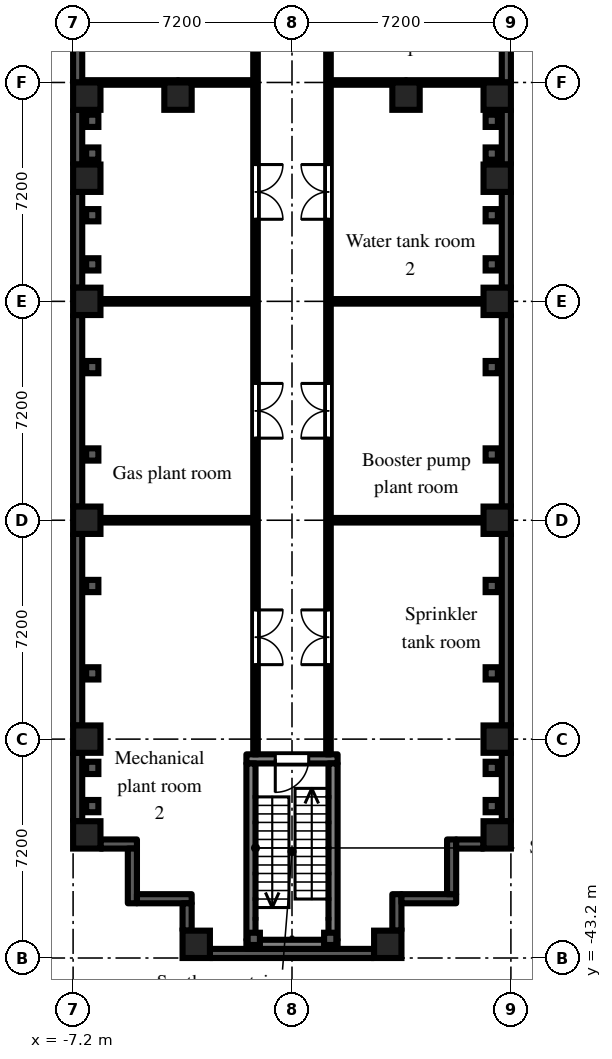
"""IFC4 building model, lengths in metres.
Left out: names, types, materials, properties, quantities, classifications, styles, units other than length and angle.
Written with IfcOpenShell. Run it as: python <this file> out.ifc"""

import sys

from ifc_helpers import new_model, si_unit, direction, frame, frame_2d, origin, origin_2d, place, context, subcontext, project, spatial, rectangle, extrude, element, fill, save


model = new_model("IFC4")
c1 = context("Model", 3, precision=1e-05, world=origin(), true_north=direction((0.0, 1.0)))
c2 = subcontext(c1, "Body", "Model", "MODEL_VIEW")
j1 = project(units=[si_unit("LENGTHUNIT", "METRE"), si_unit("PLANEANGLEUNIT", "RADIAN")], contexts=[c1])
p1 = place(None, origin())
s1 = spatial("IfcSite", under=j1, at=p1, CompositionType="ELEMENT")
p2 = place(p1, origin())
s2 = spatial("IfcBuilding", under=s1, at=p2, CompositionType="ELEMENT")
p3 = place(p2, frame((0.0, 0.0, 62.7)))
s3 = spatial("IfcBuildingStorey", under=s2, at=p3, CompositionType="ELEMENT", Elevation=62.7)
for number, where, z_axis, x_axis in (
    (1, (-6.75, -39.15, 0.0), (0.0, 0.0, 1.0), (1.0, 0.0, 0.0)),
    (2, (-6.75, -36.0, 0.0), (0.0, 0.0, 1.0), (1.0, 0.0, 0.0)),
    (3, (-6.75, -28.8, 0.0), (0.0, 0.0, 1.0), (1.0, 0.0, 0.0)),
    (4, (-6.75, -21.6, 0.0), (0.0, 0.0, 1.0), (1.0, 0.0, 0.0)),
    (5, (-6.75, -17.55, 0.0), (0.0, 0.0, 1.0), (1.0, 0.0, 0.0)),
    (6, (-6.75, -14.85, 0.0), (0.0, 0.0, 1.0), (1.0, 0.0, 0.0)),
    (7, (-3.75, -14.85, 0.0), (0.0, 0.0, 1.0), (1.0, 0.0, 0.0)),
    (8, (-3.15, -42.75, 0.0), (0.0, 0.0, 1.0), (1.0, 0.0, 0.0)),
    (9, (3.15, -42.75, 0.0), (0.0, 0.0, 1.0), (1.0, 0.0, 0.0)),
    (10, (3.75, -14.85, 0.0), (0.0, 0.0, 1.0), (1.0, 0.0, 0.0)),
    (11, (6.75, -39.15, 0.0), (0.0, 0.0, 1.0), (1.0, 0.0, 0.0)),
    (12, (6.75, -36.0, 0.0), (0.0, 0.0, 1.0), (1.0, 0.0, 0.0)),
    (13, (6.75, -28.8, 0.0), (0.0, 0.0, 1.0), (1.0, 0.0, 0.0)),
    (14, (6.75, -21.6, 0.0), (0.0, 0.0, 1.0), (1.0, 0.0, 0.0)),
    (15, (6.75, -17.55, 0.0), (0.0, 0.0, 1.0), (1.0, 0.0, 0.0)),
    (16, (6.75, -14.85, 0.0), (0.0, 0.0, 1.0), (1.0, 0.0, 0.0)),
):
    element("IfcColumn", number, at=place(p3, frame(where, z_axis=z_axis, x_axis=x_axis)), inside=s3, PredefinedType="COLUMN", context=c2, shape_type="SweptSolid", body=[
        extrude(rectangle(XDim=0.9, YDim=0.9, at=origin_2d()), origin(), (0.0, 0.0, 1.0), 4.2),
    ])
p4 = place(p3, frame((-7.05, -7.2, 0.0), z_axis=(0.0, 0.0, 1.0), x_axis=(0.0, -1.0, 0.0)))
e17 = element("IfcWall", 17, at=p4, inside=s3, PredefinedType="SOLIDWALL", context=c2, shape_type="SweptSolid", body=[
    extrude(rectangle(XDim=7.2, YDim=0.3, at=frame_2d((3.6, 0.0))), origin(), (0.0, 0.0, 1.0), 3.775),
])
p5 = place(p3, frame((-7.05, -15.3, 0.0), z_axis=(0.0, 0.0, 1.0), x_axis=(0.0, -1.0, 0.0)))
e18 = element("IfcWall", 18, at=p5, inside=s3, PredefinedType="SOLIDWALL", context=c2, shape_type="SweptSolid", body=[
    extrude(rectangle(XDim=1.8, YDim=0.3, at=frame_2d((0.9, 0.0))), origin(), (0.0, 0.0, 1.0), 3.3),
])
p6 = place(p3, frame((-7.05, -18.0, 0.0), z_axis=(0.0, 0.0, 1.0), x_axis=(0.0, -1.0, 0.0)))
e19 = element("IfcWall", 19, at=p6, inside=s3, PredefinedType="SOLIDWALL", context=c2, shape_type="SweptSolid", body=[
    extrude(rectangle(XDim=3.15, YDim=0.3, at=frame_2d((1.575, 0.0))), origin(), (0.0, 0.0, 1.0), 3.3),
])
for number, where, z_axis, x_axis in (
    (20, (-7.05, -22.05, 0.0), (0.0, 0.0, 1.0), (0.0, -1.0, 0.0)),
    (21, (-7.05, -29.25, 0.0), (0.0, 0.0, 1.0), (0.0, -1.0, 0.0)),
):
    element("IfcWall", number, at=place(p3, frame(where, z_axis=z_axis, x_axis=x_axis)), inside=s3, PredefinedType="SOLIDWALL", context=c2, shape_type="SweptSolid", body=[
        extrude(rectangle(XDim=6.3, YDim=0.3, at=frame_2d((3.15, 0.0))), origin(), (0.0, 0.0, 1.0), 3.3),
    ])
p7 = place(p3, frame((-7.05, -36.45, 0.0), z_axis=(0.0, 0.0, 1.0), x_axis=(0.0, -1.0, 0.0)))
e22 = element("IfcWall", 22, at=p7, inside=s3, PredefinedType="SOLIDWALL", context=c2, shape_type="SweptSolid", body=[
    extrude(rectangle(XDim=2.25, YDim=0.3, at=frame_2d((1.125, 0.0))), origin(), (0.0, 0.0, 1.0), 3.3),
])
p8 = place(p3, frame((-6.3, -39.45, 0.0), z_axis=(0.0, 0.0, 1.0), x_axis=(1.0, 0.0, 0.0)))
e23 = element("IfcWall", 23, at=p8, inside=s3, PredefinedType="SOLIDWALL", context=c2, shape_type="SweptSolid", body=[
    extrude(rectangle(XDim=1.2, YDim=0.3, at=frame_2d((0.6, 0.0))), origin(), (0.0, 0.0, 1.0), 3.775),
])
p9 = place(p3, frame((-5.25, -39.6, 0.0), z_axis=(0.0, 0.0, 1.0), x_axis=(0.0, -1.0, 0.0)))
e24 = element("IfcWall", 24, at=p9, inside=s3, PredefinedType="SOLIDWALL", context=c2, shape_type="SweptSolid", body=[
    extrude(rectangle(XDim=1.8, YDim=0.3, at=frame_2d((0.9, 0.0))), origin(), (0.0, 0.0, 1.0), 3.775),
])
p10 = place(p3, frame((-5.1, -41.25, 0.0), z_axis=(0.0, 0.0, 1.0), x_axis=(1.0, 0.0, 0.0)))
e25 = element("IfcWall", 25, at=p10, inside=s3, PredefinedType="SOLIDWALL", context=c2, shape_type="SweptSolid", body=[
    extrude(rectangle(XDim=1.8, YDim=0.3, at=frame_2d((0.9, 0.0))), origin(), (0.0, 0.0, 1.0), 3.775),
])
p11 = place(p3, frame((-3.45, -41.4, 0.0), z_axis=(0.0, 0.0, 1.0), x_axis=(0.0, -1.0, 0.0)))
e26 = element("IfcWall", 26, at=p11, inside=s3, PredefinedType="SOLIDWALL", context=c2, shape_type="SweptSolid", body=[
    extrude(rectangle(XDim=0.9, YDim=0.3, at=frame_2d((0.45, 0.0))), origin(), (0.0, 0.0, 1.0), 3.775),
])
p12 = place(p3, frame((-2.7, -43.05, 0.0), z_axis=(0.0, 0.0, 1.0), x_axis=(1.0, 0.0, 0.0)))
e27 = element("IfcWall", 27, at=p12, inside=s3, PredefinedType="SOLIDWALL", context=c2, shape_type="SweptSolid", body=[
    extrude(rectangle(XDim=5.4, YDim=0.3, at=frame_2d((2.7, 0.0))), origin(), (0.0, 0.0, 1.0), 3.3),
])
p13 = place(p3, frame((3.45, -42.3, 0.0), z_axis=(0.0, 0.0, 1.0), x_axis=(0.0, 1.0, 0.0)))
e28 = element("IfcWall", 28, at=p13, inside=s3, PredefinedType="SOLIDWALL", context=c2, shape_type="SweptSolid", body=[
    extrude(rectangle(XDim=1.2, YDim=0.3, at=frame_2d((0.6, 0.0))), origin(), (0.0, 0.0, 1.0), 3.775),
])
p14 = place(p3, frame((3.6, -41.25, 0.0), z_axis=(0.0, 0.0, 1.0), x_axis=(1.0, 0.0, 0.0)))
e29 = element("IfcWall", 29, at=p14, inside=s3, PredefinedType="SOLIDWALL", context=c2, shape_type="SweptSolid", body=[
    extrude(rectangle(XDim=1.8, YDim=0.3, at=frame_2d((0.9, 0.0))), origin(), (0.0, 0.0, 1.0), 3.775),
])
p15 = place(p3, frame((5.25, -41.1, 0.0), z_axis=(0.0, 0.0, 1.0), x_axis=(0.0, 1.0, 0.0)))
e30 = element("IfcWall", 30, at=p15, inside=s3, PredefinedType="SOLIDWALL", context=c2, shape_type="SweptSolid", body=[
    extrude(rectangle(XDim=1.8, YDim=0.3, at=frame_2d((0.9, 0.0))), origin(), (0.0, 0.0, 1.0), 3.775),
])
p16 = place(p3, frame((5.4, -39.45, 0.0), z_axis=(0.0, 0.0, 1.0), x_axis=(1.0, 0.0, 0.0)))
e31 = element("IfcWall", 31, at=p16, inside=s3, PredefinedType="SOLIDWALL", context=c2, shape_type="SweptSolid", body=[
    extrude(rectangle(XDim=0.9, YDim=0.3, at=frame_2d((0.45, 0.0))), origin(), (0.0, 0.0, 1.0), 3.775),
])
p17 = place(p3, frame((7.05, -38.7, 0.0), z_axis=(0.0, 0.0, 1.0), x_axis=(0.0, 1.0, 0.0)))
e32 = element("IfcWall", 32, at=p17, inside=s3, PredefinedType="SOLIDWALL", context=c2, shape_type="SweptSolid", body=[
    extrude(rectangle(XDim=2.25, YDim=0.3, at=frame_2d((1.125, 0.0))), origin(), (0.0, 0.0, 1.0), 3.3),
])
for number, where, z_axis, x_axis in (
    (33, (7.05, -35.55, 0.0), (0.0, 0.0, 1.0), (0.0, 1.0, 0.0)),
    (34, (7.05, -28.35, 0.0), (0.0, 0.0, 1.0), (0.0, 1.0, 0.0)),
):
    element("IfcWall", number, at=place(p3, frame(where, z_axis=z_axis, x_axis=x_axis)), inside=s3, PredefinedType="SOLIDWALL", context=c2, shape_type="SweptSolid", body=[
        extrude(rectangle(XDim=6.3, YDim=0.3, at=frame_2d((3.15, 0.0))), origin(), (0.0, 0.0, 1.0), 3.3),
    ])
p18 = place(p3, frame((7.05, -21.15, 0.0), z_axis=(0.0, 0.0, 1.0), x_axis=(0.0, 1.0, 0.0)))
e35 = element("IfcWall", 35, at=p18, inside=s3, PredefinedType="SOLIDWALL", context=c2, shape_type="SweptSolid", body=[
    extrude(rectangle(XDim=3.15, YDim=0.3, at=frame_2d((1.575, 0.0))), origin(), (0.0, 0.0, 1.0), 3.3),
])
p19 = place(p3, frame((7.05, -17.1, 0.0), z_axis=(0.0, 0.0, 1.0), x_axis=(0.0, 1.0, 0.0)))
e36 = element("IfcWall", 36, at=p19, inside=s3, PredefinedType="SOLIDWALL", context=c2, shape_type="SweptSolid", body=[
    extrude(rectangle(XDim=1.8, YDim=0.3, at=frame_2d((0.9, 0.0))), origin(), (0.0, 0.0, 1.0), 3.3),
])
p20 = place(p3, frame((7.05, -14.4, 0.0), z_axis=(0.0, 0.0, 1.0), x_axis=(0.0, 1.0, 0.0)))
e37 = element("IfcWall", 37, at=p20, inside=s3, PredefinedType="SOLIDWALL", context=c2, shape_type="SweptSolid", body=[
    extrude(rectangle(XDim=7.5, YDim=0.3, at=frame_2d((3.75, 0.0))), origin(), (0.0, 0.0, 1.0), 3.775),
])
p21 = place(p3, frame((-1.5, -36.65, 0.0), z_axis=(0.0, 0.0, 1.0), x_axis=(1.0, 0.0, 0.0)))
e38 = element("IfcWall", 38, at=p21, inside=s3, PredefinedType="SHEAR", context=c2, shape_type="SweptSolid", body=[
    extrude(rectangle(XDim=3.0, YDim=0.3, at=frame_2d((1.5, 0.0))), origin(), (0.0, 0.0, 1.0), 3.775),
])
p22 = place(p21, frame((0.95, 0.0, 0.0)))
e39 = element("IfcOpeningElement", 39, at=p22, cuts=e38, PredefinedType="OPENING", context=c2, shape_type="SweptSolid", body=[
    extrude(rectangle(XDim=1.1, YDim=2.1, at=frame_2d((0.55, 1.05))), frame((0.0, 0.16, 0.0), z_axis=(0.0, -1.0, 0.0), x_axis=(1.0, 0.0, 0.0)), (0.0, 0.0, 1.0), 0.32),
])
p23 = place(p3, frame((-1.5, -42.75, 0.0), z_axis=(0.0, 0.0, 1.0), x_axis=(1.0, 0.0, 0.0)))
e40 = element("IfcWall", 40, at=p23, inside=s3, PredefinedType="SHEAR", context=c2, shape_type="SweptSolid", body=[
    extrude(rectangle(XDim=3.0, YDim=0.3, at=frame_2d((1.5, 0.0))), origin(), (0.0, 0.0, 1.0), 3.775),
])
for number, where, z_axis, x_axis in (
    (41, (-1.35, -36.8, 0.0), (0.0, 0.0, 1.0), (0.0, -1.0, 0.0)),
    (42, (1.35, -36.8, 0.0), (0.0, 0.0, 1.0), (0.0, -1.0, 0.0)),
):
    element("IfcWall", number, at=place(p3, frame(where, z_axis=z_axis, x_axis=x_axis)), inside=s3, PredefinedType="SHEAR", context=c2, shape_type="SweptSolid", body=[
        extrude(rectangle(XDim=5.8, YDim=0.3, at=frame_2d((2.9, 0.0))), origin(), (0.0, 0.0, 1.0), 3.775),
    ])
for number, where, z_axis, x_axis in (
    (43, (-6.9, -28.8, 0.0), (0.0, 0.0, 1.0), (1.0, 0.0, 0.0)),
    (44, (-6.9, -21.6, 0.0), (0.0, 0.0, 1.0), (1.0, 0.0, 0.0)),
):
    element("IfcWall", number, at=place(p3, frame(where, z_axis=z_axis, x_axis=x_axis)), inside=s3, PredefinedType="PARTITIONING", context=c2, shape_type="SweptSolid", body=[
        extrude(rectangle(XDim=5.625, YDim=0.15, at=frame_2d((2.812, 0.0))), origin(), (0.0, 0.0, 1.0), 3.775),
    ])
p24 = place(p3, frame((-6.9, -14.4, 0.0), z_axis=(0.0, 0.0, 1.0), x_axis=(1.0, 0.0, 0.0)))
e45 = element("IfcWall", 45, at=p24, inside=s3, PredefinedType="PARTITIONING", context=c2, shape_type="SweptSolid", body=[
    extrude(rectangle(XDim=3.15, YDim=0.15, at=frame_2d((1.575, 0.0))), origin(), (0.0, 0.0, 1.0), 3.3),
])
p25 = place(p3, frame((-1.2, -36.5, 0.0), z_axis=(0.0, 0.0, 1.0), x_axis=(0.0, 1.0, 0.0)))
e46 = element("IfcWall", 46, at=p25, inside=s3, PredefinedType="PARTITIONING", context=c2, shape_type="SweptSolid", body=[
    extrude(rectangle(XDim=35.375, YDim=0.15, at=frame_2d((17.688, 0.0))), origin(), (0.0, 0.0, 1.0), 3.775),
])
p26 = place(p25, frame((29.95, 0.0, 0.0)))
e47 = element("IfcOpeningElement", 47, at=p26, cuts=e46, PredefinedType="OPENING", context=c2, shape_type="SweptSolid", body=[
    extrude(rectangle(XDim=1.2, YDim=2.1, at=frame_2d((0.6, 1.05))), frame((0.0, 0.085, 0.0), z_axis=(0.0, -1.0, 0.0), x_axis=(1.0, 0.0, 0.0)), (0.0, 0.0, 1.0), 0.17),
])
p27 = place(p25, frame((34.3, 0.0, 0.0)))
e48 = element("IfcOpeningElement", 48, at=p27, cuts=e46, PredefinedType="OPENING", context=c2, shape_type="SweptSolid", body=[
    extrude(rectangle(XDim=0.9, YDim=2.1, at=frame_2d((0.45, 1.05))), frame((0.0, 0.085, 0.0), z_axis=(0.0, -1.0, 0.0), x_axis=(1.0, 0.0, 0.0)), (0.0, 0.0, 1.0), 0.17),
])
p28 = place(p25, frame((24.8, 0.0, 0.0)))
e49 = element("IfcOpeningElement", 49, at=p28, cuts=e46, PredefinedType="OPENING", context=c2, shape_type="SweptSolid", body=[
    extrude(rectangle(XDim=1.8, YDim=2.1, at=frame_2d((0.9, 1.05))), frame((0.0, 0.085, 0.0), z_axis=(0.0, -1.0, 0.0), x_axis=(1.0, 0.0, 0.0)), (0.0, 0.0, 1.0), 0.17),
])
p29 = place(p25, frame((17.6, 0.0, 0.0)))
e50 = element("IfcOpeningElement", 50, at=p29, cuts=e46, PredefinedType="OPENING", context=c2, shape_type="SweptSolid", body=[
    extrude(rectangle(XDim=1.8, YDim=2.1, at=frame_2d((0.9, 1.05))), frame((0.0, 0.085, 0.0), z_axis=(0.0, -1.0, 0.0), x_axis=(1.0, 0.0, 0.0)), (0.0, 0.0, 1.0), 0.17),
])
p30 = place(p25, frame((10.4, 0.0, 0.0)))
e51 = element("IfcOpeningElement", 51, at=p30, cuts=e46, PredefinedType="OPENING", context=c2, shape_type="SweptSolid", body=[
    extrude(rectangle(XDim=1.8, YDim=2.1, at=frame_2d((0.9, 1.05))), frame((0.0, 0.085, 0.0), z_axis=(0.0, -1.0, 0.0), x_axis=(1.0, 0.0, 0.0)), (0.0, 0.0, 1.0), 0.17),
])
p31 = place(p25, frame((2.95, 0.0, 0.0)))
e52 = element("IfcOpeningElement", 52, at=p31, cuts=e46, PredefinedType="OPENING", context=c2, shape_type="SweptSolid", body=[
    extrude(rectangle(XDim=1.8, YDim=2.1, at=frame_2d((0.9, 1.05))), frame((0.0, 0.085, 0.0), z_axis=(0.0, -1.0, 0.0), x_axis=(1.0, 0.0, 0.0)), (0.0, 0.0, 1.0), 0.17),
])
p32 = place(p3, frame((1.2, -36.5, 0.0), z_axis=(0.0, 0.0, 1.0), x_axis=(0.0, 1.0, 0.0)))
e53 = element("IfcWall", 53, at=p32, inside=s3, PredefinedType="PARTITIONING", context=c2, shape_type="SweptSolid", body=[
    extrude(rectangle(XDim=35.375, YDim=0.15, at=frame_2d((17.688, 0.0))), origin(), (0.0, 0.0, 1.0), 3.775),
])
p33 = place(p32, frame((30.15, 0.0, 0.0)))
e54 = element("IfcOpeningElement", 54, at=p33, cuts=e53, PredefinedType="OPENING", context=c2, shape_type="SweptSolid", body=[
    extrude(rectangle(XDim=1.2, YDim=2.1, at=frame_2d((0.6, 1.05))), frame((0.0, 0.085, 0.0), z_axis=(0.0, -1.0, 0.0), x_axis=(1.0, 0.0, 0.0)), (0.0, 0.0, 1.0), 0.17),
])
p34 = place(p32, frame((24.8, 0.0, 0.0)))
e55 = element("IfcOpeningElement", 55, at=p34, cuts=e53, PredefinedType="OPENING", context=c2, shape_type="SweptSolid", body=[
    extrude(rectangle(XDim=1.8, YDim=2.1, at=frame_2d((0.9, 1.05))), frame((0.0, 0.085, 0.0), z_axis=(0.0, -1.0, 0.0), x_axis=(1.0, 0.0, 0.0)), (0.0, 0.0, 1.0), 0.17),
])
p35 = place(p32, frame((17.6, 0.0, 0.0)))
e56 = element("IfcOpeningElement", 56, at=p35, cuts=e53, PredefinedType="OPENING", context=c2, shape_type="SweptSolid", body=[
    extrude(rectangle(XDim=1.8, YDim=2.1, at=frame_2d((0.9, 1.05))), frame((0.0, 0.085, 0.0), z_axis=(0.0, -1.0, 0.0), x_axis=(1.0, 0.0, 0.0)), (0.0, 0.0, 1.0), 0.17),
])
p36 = place(p32, frame((10.4, 0.0, 0.0)))
e57 = element("IfcOpeningElement", 57, at=p36, cuts=e53, PredefinedType="OPENING", context=c2, shape_type="SweptSolid", body=[
    extrude(rectangle(XDim=1.8, YDim=2.1, at=frame_2d((0.9, 1.05))), frame((0.0, 0.085, 0.0), z_axis=(0.0, -1.0, 0.0), x_axis=(1.0, 0.0, 0.0)), (0.0, 0.0, 1.0), 0.17),
])
p37 = place(p32, frame((2.95, 0.0, 0.0)))
e58 = element("IfcOpeningElement", 58, at=p37, cuts=e53, PredefinedType="OPENING", context=c2, shape_type="SweptSolid", body=[
    extrude(rectangle(XDim=1.8, YDim=2.1, at=frame_2d((0.9, 1.05))), frame((0.0, 0.085, 0.0), z_axis=(0.0, -1.0, 0.0), x_axis=(1.0, 0.0, 0.0)), (0.0, 0.0, 1.0), 0.17),
])
for number, where, z_axis, x_axis in (
    (59, (1.275, -28.8, 0.0), (0.0, 0.0, 1.0), (1.0, 0.0, 0.0)),
    (60, (1.275, -21.6, 0.0), (0.0, 0.0, 1.0), (1.0, 0.0, 0.0)),
):
    element("IfcWall", number, at=place(p3, frame(where, z_axis=z_axis, x_axis=x_axis)), inside=s3, PredefinedType="PARTITIONING", context=c2, shape_type="SweptSolid", body=[
        extrude(rectangle(XDim=5.625, YDim=0.15, at=frame_2d((2.812, 0.0))), origin(), (0.0, 0.0, 1.0), 3.775),
    ])
for number, where, z_axis, x_axis in (
    (61, (1.275, -14.4, 0.0), (0.0, 0.0, 1.0), (1.0, 0.0, 0.0)),
    (62, (-3.75, -14.4, 0.0), (0.0, 0.0, 1.0), (1.0, 0.0, 0.0)),
):
    element("IfcWall", number, at=place(p3, frame(where, z_axis=z_axis, x_axis=x_axis)), inside=s3, PredefinedType="PARTITIONING", context=c2, shape_type="SweptSolid", body=[
        extrude(rectangle(XDim=2.475, YDim=0.15, at=frame_2d((1.238, 0.0))), origin(), (0.0, 0.0, 1.0), 3.775),
    ])
p38 = place(p3, frame((3.75, -14.4, 0.0), z_axis=(0.0, 0.0, 1.0), x_axis=(1.0, 0.0, 0.0)))
e63 = element("IfcWall", 63, at=p38, inside=s3, PredefinedType="PARTITIONING", context=c2, shape_type="SweptSolid", body=[
    extrude(rectangle(XDim=3.15, YDim=0.15, at=frame_2d((1.575, 0.0))), origin(), (0.0, 0.0, 1.0), 3.3),
])
p39 = place(p22, frame((1.1, 0.0, 0.0), z_axis=(0.0, 0.0, 1.0), x_axis=(-1.0, 0.0, 0.0)))
e64 = element("IfcDoor", 64, at=p39, inside=s3, OperationType="SINGLE_SWING_RIGHT", PredefinedType="DOOR", context=c2, shape_type="SweptSolid", body=[
    extrude(rectangle(XDim=1.1, YDim=2.1, at=frame_2d((0.55, 1.05))), frame((0.0, 0.025, 0.0), z_axis=(0.0, -1.0, 0.0), x_axis=(1.0, 0.0, 0.0)), (0.0, 0.0, 1.0), 0.05),
])
fill(e39, e64)
p40 = place(p35, origin())
e65 = element("IfcDoor", 65, at=p40, inside=s3, OperationType="DOUBLE_DOOR_DOUBLE_SWING", PredefinedType="DOOR", context=c2, shape_type="SweptSolid", body=[
    extrude(rectangle(XDim=1.8, YDim=2.1, at=frame_2d((0.9, 1.05))), frame((0.0, 0.025, 0.0), z_axis=(0.0, -1.0, 0.0), x_axis=(1.0, 0.0, 0.0)), (0.0, 0.0, 1.0), 0.05),
])
fill(e56, e65)
p41 = place(p36, origin())
e66 = element("IfcDoor", 66, at=p41, inside=s3, OperationType="DOUBLE_DOOR_DOUBLE_SWING", PredefinedType="DOOR", context=c2, shape_type="SweptSolid", body=[
    extrude(rectangle(XDim=1.8, YDim=2.1, at=frame_2d((0.9, 1.05))), frame((0.0, 0.025, 0.0), z_axis=(0.0, -1.0, 0.0), x_axis=(1.0, 0.0, 0.0)), (0.0, 0.0, 1.0), 0.05),
])
fill(e57, e66)
p42 = place(p37, origin())
e67 = element("IfcDoor", 67, at=p42, inside=s3, OperationType="DOUBLE_DOOR_DOUBLE_SWING", PredefinedType="DOOR", context=c2, shape_type="SweptSolid", body=[
    extrude(rectangle(XDim=1.8, YDim=2.1, at=frame_2d((0.9, 1.05))), frame((0.0, 0.025, 0.0), z_axis=(0.0, -1.0, 0.0), x_axis=(1.0, 0.0, 0.0)), (0.0, 0.0, 1.0), 0.05),
])
fill(e58, e67)
p43 = place(p29, frame((1.8, 0.0, 0.0), z_axis=(0.0, 0.0, 1.0), x_axis=(-1.0, 0.0, 0.0)))
e68 = element("IfcDoor", 68, at=p43, inside=s3, OperationType="DOUBLE_DOOR_DOUBLE_SWING", PredefinedType="DOOR", context=c2, shape_type="SweptSolid", body=[
    extrude(rectangle(XDim=1.8, YDim=2.1, at=frame_2d((0.9, 1.05))), frame((0.0, 0.025, 0.0), z_axis=(0.0, -1.0, 0.0), x_axis=(1.0, 0.0, 0.0)), (0.0, 0.0, 1.0), 0.05),
])
fill(e50, e68)
p44 = place(p30, frame((1.8, 0.0, 0.0), z_axis=(0.0, 0.0, 1.0), x_axis=(-1.0, 0.0, 0.0)))
e69 = element("IfcDoor", 69, at=p44, inside=s3, OperationType="DOUBLE_DOOR_DOUBLE_SWING", PredefinedType="DOOR", context=c2, shape_type="SweptSolid", body=[
    extrude(rectangle(XDim=1.8, YDim=2.1, at=frame_2d((0.9, 1.05))), frame((0.0, 0.025, 0.0), z_axis=(0.0, -1.0, 0.0), x_axis=(1.0, 0.0, 0.0)), (0.0, 0.0, 1.0), 0.05),
])
fill(e51, e69)
p45 = place(p31, frame((1.8, 0.0, 0.0), z_axis=(0.0, 0.0, 1.0), x_axis=(-1.0, 0.0, 0.0)))
e70 = element("IfcDoor", 70, at=p45, inside=s3, OperationType="DOUBLE_DOOR_DOUBLE_SWING", PredefinedType="DOOR", context=c2, shape_type="SweptSolid", body=[
    extrude(rectangle(XDim=1.8, YDim=2.1, at=frame_2d((0.9, 1.05))), frame((0.0, 0.025, 0.0), z_axis=(0.0, -1.0, 0.0), x_axis=(1.0, 0.0, 0.0)), (0.0, 0.0, 1.0), 0.05),
])
fill(e52, e70)
save(model, sys.argv[1])
